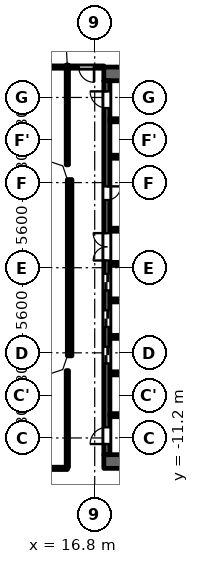
"""IFC4 building model, lengths in metres.
Left out: names, types, materials, properties, quantities, classifications, styles, units other than length and angle.
Written with IfcOpenShell. Run it as: python <this file> out.ifc"""

import sys

from ifc_helpers import new_model, si_unit, direction, frame, frame_2d, origin, place, context, subcontext, project, spatial, polyline, rectangle, outline, extrude, element, fill, save


model = new_model("IFC4")
c1 = context("Model", 3, precision=1e-05, world=origin(), true_north=direction((0.0, 1.0)))
c2 = subcontext(c1, "Body", "Model", "MODEL_VIEW")
j1 = project(units=[si_unit("LENGTHUNIT", "METRE"), si_unit("PLANEANGLEUNIT", "RADIAN")], contexts=[c1])
p1 = place(None, origin())
s1 = spatial("IfcSite", under=j1, at=p1, CompositionType="ELEMENT")
p2 = place(p1, origin())
s2 = spatial("IfcBuilding", under=s1, at=p2, CompositionType="ELEMENT")
p3 = place(p2, frame((0.0, 0.0, 25.7)))
s3 = spatial("IfcBuildingStorey", under=s2, at=p3, CompositionType="ELEMENT", Elevation=25.7)
p4 = place(p3, frame((15.15, 5.8, 0.0), z_axis=(0.0, 0.0, 1.0), x_axis=(0.0, -1.0, 0.0)))
e1 = element("IfcWall", 1, at=p4, inside=s3, PredefinedType="SOLIDWALL", context=c2, shape_type="SweptSolid", body=[
    extrude(rectangle(XDim=11.6, YDim=0.3, at=frame_2d((5.8, 0.0))), origin(), (0.0, 0.0, 1.0), 4.45),
])
for number, where, z_axis, x_axis in (
    (2, (17.4, 12.75, 0.0), (0.0, 0.0, 1.0), (1.0, 0.0, 0.0)),
    (3, (17.4, -12.75, 0.0), (0.0, 0.0, 1.0), (1.0, 0.0, 0.0)),
):
    element("IfcWall", number, at=place(p3, frame(where, z_axis=z_axis, x_axis=x_axis)), inside=s3, PredefinedType="SHEAR", context=c2, shape_type="SweptSolid", body=[
        extrude(rectangle(XDim=10.4, YDim=0.9, at=frame_2d((5.2, 0.0))), origin(), (0.0, 0.0, 1.0), 4.45),
    ])
p5 = place(p3, frame((17.6, -12.3, 0.0), z_axis=(0.0, 0.0, 1.0), x_axis=(0.0, 1.0, 0.0)))
e4 = element("IfcWall", 4, at=p5, inside=s3, PredefinedType="SHEAR", context=c2, shape_type="SweptSolid", body=[
    extrude(rectangle(XDim=24.6, YDim=0.4, at=frame_2d((12.3, 0.0))), origin(), (0.0, 0.0, 1.0), 4.45),
])
p6 = place(p5, frame((6.0, 0.0, 0.0)))
e5 = element("IfcOpeningElement", 5, at=p6, cuts=e4, PredefinedType="OPENING", context=c2, shape_type="SweptSolid", body=[
    extrude(rectangle(XDim=1.1, YDim=2.1, at=frame_2d((0.55, 1.05))), frame((0.0, 0.21, 0.0), z_axis=(0.0, -1.0, 0.0), x_axis=(1.0, 0.0, 0.0)), (0.0, 0.0, 1.0), 0.42),
])
p7 = place(p5, frame((8.4, 0.0, 0.0)))
e6 = element("IfcOpeningElement", 6, at=p7, cuts=e4, PredefinedType="OPENING", context=c2, shape_type="SweptSolid", body=[
    extrude(rectangle(XDim=1.1, YDim=2.1, at=frame_2d((0.55, 1.05))), frame((0.0, 0.21, 0.0), z_axis=(0.0, -1.0, 0.0), x_axis=(1.0, 0.0, 0.0)), (0.0, 0.0, 1.0), 0.42),
])
p8 = place(p5, frame((10.8, 0.0, 0.0)))
e7 = element("IfcOpeningElement", 7, at=p8, cuts=e4, PredefinedType="OPENING", context=c2, shape_type="SweptSolid", body=[
    extrude(rectangle(XDim=1.1, YDim=2.1, at=frame_2d((0.55, 1.05))), frame((0.0, 0.21, 0.0), z_axis=(0.0, -1.0, 0.0), x_axis=(1.0, 0.0, 0.0)), (0.0, 0.0, 1.0), 0.42),
])
p9 = place(p5, frame((16.75, 0.0, 0.0)))
e8 = element("IfcOpeningElement", 8, at=p9, cuts=e4, PredefinedType="OPENING", context=c2, shape_type="SweptSolid", body=[
    extrude(rectangle(XDim=0.9, YDim=2.1, at=frame_2d((0.45, 1.05))), frame((0.0, 0.21, 0.0), z_axis=(0.0, -1.0, 0.0), x_axis=(1.0, 0.0, 0.0)), (0.0, 0.0, 1.0), 0.42),
])
p10 = place(p5, frame((22.8, 0.0, 0.0)))
e9 = element("IfcOpeningElement", 9, at=p10, cuts=e4, PredefinedType="OPENING", context=c2, shape_type="SweptSolid", body=[
    extrude(rectangle(XDim=1.1, YDim=2.1, at=frame_2d((0.55, 1.05))), frame((0.0, 0.21, 0.0), z_axis=(0.0, -1.0, 0.0), x_axis=(1.0, 0.0, 0.0)), (0.0, 0.0, 1.0), 0.42),
])
p11 = place(p5, frame((0.7, 0.0, 0.0)))
e10 = element("IfcOpeningElement", 10, at=p11, cuts=e4, PredefinedType="OPENING", context=c2, shape_type="SweptSolid", body=[
    extrude(rectangle(XDim=1.1, YDim=2.1, at=frame_2d((0.55, 1.05))), frame((0.0, 0.21, 0.0), z_axis=(0.0, -1.0, 0.0), x_axis=(1.0, 0.0, 0.0)), (0.0, 0.0, 1.0), 0.42),
])
p12 = place(p5, frame((12.775, 0.0, 0.0)))
e11 = element("IfcOpeningElement", 11, at=p12, cuts=e4, PredefinedType="OPENING", context=c2, shape_type="SweptSolid", body=[
    extrude(rectangle(XDim=1.8, YDim=2.1, at=frame_2d((0.9, 1.05))), frame((0.0, 0.21, 0.0), z_axis=(0.0, -1.0, 0.0), x_axis=(1.0, 0.0, 0.0)), (0.0, 0.0, 1.0), 0.42),
])
p13 = place(p3, frame((17.8, -9.7, 0.0), z_axis=(0.0, 0.0, 1.0), x_axis=(1.0, 0.0, 0.0)))
e12 = element("IfcWall", 12, at=p13, inside=s3, PredefinedType="SHEAR", context=c2, shape_type="SweptSolid", body=[
    extrude(rectangle(XDim=8.3, YDim=0.2, at=frame_2d((4.15, 0.0))), origin(), (0.0, 0.0, 1.0), 4.45),
])
p14 = place(p13, frame((0.85, 0.0, 0.0)))
e13 = element("IfcOpeningElement", 13, at=p14, cuts=e12, PredefinedType="OPENING", context=c2, shape_type="SweptSolid", body=[
    extrude(rectangle(XDim=1.1, YDim=2.1, at=frame_2d((0.55, 1.05))), frame((0.0, 0.11, 0.0), z_axis=(0.0, -1.0, 0.0), x_axis=(1.0, 0.0, 0.0)), (0.0, 0.0, 1.0), 0.22),
])
p15 = place(p13, frame((3.75, 0.0, 0.0)))
e14 = element("IfcOpeningElement", 14, at=p15, cuts=e12, PredefinedType="OPENING", context=c2, shape_type="SweptSolid", body=[
    extrude(rectangle(XDim=1.1, YDim=2.1, at=frame_2d((0.55, 1.05))), frame((0.0, 0.11, 0.0), z_axis=(0.0, -1.0, 0.0), x_axis=(1.0, 0.0, 0.0)), (0.0, 0.0, 1.0), 0.22),
])
for number, where, z_axis, x_axis in (
    (15, (17.8, -6.95, 0.0), (0.0, 0.0, 1.0), (1.0, 0.0, 0.0)),
    (16, (17.8, -4.55, 0.0), (0.0, 0.0, 1.0), (1.0, 0.0, 0.0)),
    (17, (17.8, -2.15, 0.0), (0.0, 0.0, 1.0), (1.0, 0.0, 0.0)),
):
    element("IfcWall", number, at=place(p3, frame(where, z_axis=z_axis, x_axis=x_axis)), inside=s3, PredefinedType="PARTITIONING", context=c2, shape_type="SweptSolid", body=[
        extrude(rectangle(XDim=2.8, YDim=0.2, at=frame_2d((1.4, 0.0))), origin(), (0.0, 0.0, 1.0), 4.45),
    ])
for number, where, z_axis, x_axis in (
    (18, (17.8, 0.25, 0.0), (0.0, 0.0, 1.0), (1.0, 0.0, 0.0)),
    (19, (17.8, 2.5, 0.0), (0.0, 0.0, 1.0), (1.0, 0.0, 0.0)),
):
    element("IfcWall", number, at=place(p3, frame(where, z_axis=z_axis, x_axis=x_axis)), inside=s3, PredefinedType="PARTITIONING", context=c2, shape_type="SweptSolid", body=[
        extrude(rectangle(XDim=3.0, YDim=0.2, at=frame_2d((1.5, 0.0))), origin(), (0.0, 0.0, 1.0), 4.45),
    ])
p16 = place(p3, frame((17.8, 7.3, 0.0), z_axis=(0.0, 0.0, 1.0), x_axis=(1.0, 0.0, 0.0)))
e20 = element("IfcWall", 20, at=p16, inside=s3, PredefinedType="PARTITIONING", context=c2, shape_type="SweptSolid", body=[
    extrude(rectangle(XDim=2.8, YDim=0.2, at=frame_2d((1.4, 0.0))), origin(), (0.0, 0.0, 1.0), 4.45),
])
p17 = place(p3, frame((17.8, 9.7, 0.0), z_axis=(0.0, 0.0, 1.0), x_axis=(1.0, 0.0, 0.0)))
e21 = element("IfcWall", 21, at=p17, inside=s3, PredefinedType="SHEAR", context=c2, shape_type="SweptSolid", body=[
    extrude(rectangle(XDim=8.3, YDim=0.2, at=frame_2d((4.15, 0.0))), origin(), (0.0, 0.0, 1.0), 4.45),
])
p18 = place(p17, frame((0.85, 0.0, 0.0)))
e22 = element("IfcOpeningElement", 22, at=p18, cuts=e21, PredefinedType="OPENING", context=c2, shape_type="SweptSolid", body=[
    extrude(rectangle(XDim=1.1, YDim=2.1, at=frame_2d((0.55, 1.05))), frame((0.0, 0.11, 0.0), z_axis=(0.0, -1.0, 0.0), x_axis=(1.0, 0.0, 0.0)), (0.0, 0.0, 1.0), 0.22),
])
p19 = place(p17, frame((3.75, 0.0, 0.0)))
e23 = element("IfcOpeningElement", 23, at=p19, cuts=e21, PredefinedType="OPENING", context=c2, shape_type="SweptSolid", body=[
    extrude(rectangle(XDim=1.1, YDim=2.1, at=frame_2d((0.55, 1.05))), frame((0.0, 0.11, 0.0), z_axis=(0.0, -1.0, 0.0), x_axis=(1.0, 0.0, 0.0)), (0.0, 0.0, 1.0), 0.22),
])
p20 = place(p3, frame((-15.005, -13.2, 0.0), z_axis=(0.0, 0.0, 1.0), x_axis=(1.0, 0.0, 0.0)))
e24 = element("IfcWall", 24, at=p20, inside=s3, PredefinedType="PARTITIONING", context=c2, shape_type="SweptSolid", body=[
    extrude(rectangle(XDim=30.01, YDim=0.15, at=frame_2d((15.005, 0.0))), origin(), (0.0, 0.0, 1.0), 4.45),
])
p21 = place(p20, frame((16.855, 0.0, 0.0)))
e25 = element("IfcOpeningElement", 25, at=p21, cuts=e24, PredefinedType="OPENING", context=c2, shape_type="SweptSolid", body=[
    extrude(rectangle(XDim=1.8, YDim=2.1, at=frame_2d((0.9, 1.05))), frame((0.0, 0.085, 0.0), z_axis=(0.0, -1.0, 0.0), x_axis=(1.0, 0.0, 0.0)), (0.0, 0.0, 1.0), 0.17),
])
p22 = place(p3, frame((-17.4, 13.2, 0.0), z_axis=(0.0, 0.0, 1.0), x_axis=(1.0, 0.0, 0.0)))
e26 = element("IfcWall", 26, at=p22, inside=s3, PredefinedType="PARTITIONING", context=c2, shape_type="SweptSolid", body=[
    extrude(rectangle(XDim=34.8, YDim=0.15, at=frame_2d((17.4, 0.0))), origin(), (0.0, 0.0, 1.0), 4.45),
])
p23 = place(p22, frame((3.05, 0.0, 0.0)))
e27 = element("IfcOpeningElement", 27, at=p23, cuts=e26, PredefinedType="OPENING", context=c2, shape_type="SweptSolid", body=[
    extrude(rectangle(XDim=1.8, YDim=2.1, at=frame_2d((0.9, 1.05))), frame((0.0, 0.085, 0.0), z_axis=(0.0, -1.0, 0.0), x_axis=(1.0, 0.0, 0.0)), (0.0, 0.0, 1.0), 0.17),
])
p24 = place(p22, frame((0.75, 0.0, 0.0)))
e28 = element("IfcOpeningElement", 28, at=p24, cuts=e26, PredefinedType="OPENING", context=c2, shape_type="SweptSolid", body=[
    extrude(rectangle(XDim=1.0, YDim=2.1, at=frame_2d((0.5, 1.05))), frame((0.0, 0.085, 0.0), z_axis=(0.0, -1.0, 0.0), x_axis=(1.0, 0.0, 0.0)), (0.0, 0.0, 1.0), 0.17),
])
p25 = place(p22, frame((33.15, 0.0, 0.0)))
e29 = element("IfcOpeningElement", 29, at=p25, cuts=e26, PredefinedType="OPENING", context=c2, shape_type="SweptSolid", body=[
    extrude(rectangle(XDim=1.0, YDim=2.1, at=frame_2d((0.5, 1.05))), frame((0.0, 0.085, 0.0), z_axis=(0.0, -1.0, 0.0), x_axis=(1.0, 0.0, 0.0)), (0.0, 0.0, 1.0), 0.17),
])
for number, where, z_axis, x_axis in (
    (30, (15.0, -13.125, 0.0), (0.0, 0.0, 1.0), (0.0, 1.0, 0.0)),
    (31, (15.0, 6.769, 0.0), (0.0, 0.0, 1.0), (0.0, 1.0, 0.0)),
):
    element("IfcWall", number, at=place(p3, frame(where, z_axis=z_axis, x_axis=x_axis)), inside=s3, PredefinedType="PARTITIONING", context=c2, shape_type="SweptSolid", body=[
        extrude(rectangle(XDim=6.356, YDim=0.15, at=frame_2d((3.178, 0.0))), origin(), (0.0, 0.0, 1.0), 4.45),
    ])
p26 = place(p3, origin())
e32 = element("IfcWall", 32, at=p26, inside=s3, PredefinedType="SOLIDWALL", context=c2, shape_type="SweptSolid", body=[
    extrude(outline(polyline([(14.937, 6.937), (13.849, 7.3), (13.8, 7.3), (13.8, 7.0), (14.7, 6.7), (15.0, 5.8), (15.3, 5.8), (15.3, 5.849), (14.937, 6.937)])), origin(), (0.0, 0.0, 1.0), 4.45),
])
e33 = element("IfcWall", 33, at=p26, inside=s3, PredefinedType="SOLIDWALL", context=c2, shape_type="SweptSolid", body=[
    extrude(outline(polyline([(14.937, -6.937), (15.3, -5.849), (15.3, -5.8), (15.0, -5.8), (14.7, -6.7), (13.8, -7.0), (13.8, -7.3), (13.849, -7.3), (14.937, -6.937)])), origin(), (0.0, 0.0, 1.0), 4.45),
])
p27 = place(p6, origin())
e34 = element("IfcDoor", 34, at=p27, inside=s3, OperationType="DOUBLE_DOOR_SLIDING", PredefinedType="DOOR", context=c2, shape_type="SweptSolid", body=[
    extrude(rectangle(XDim=1.1, YDim=2.1, at=frame_2d((0.55, 1.05))), frame((0.0, 0.025, 0.0), z_axis=(0.0, -1.0, 0.0), x_axis=(1.0, 0.0, 0.0)), (0.0, 0.0, 1.0), 0.05),
])
fill(e5, e34)
p28 = place(p7, origin())
e35 = element("IfcDoor", 35, at=p28, inside=s3, OperationType="DOUBLE_DOOR_SLIDING", PredefinedType="DOOR", context=c2, shape_type="SweptSolid", body=[
    extrude(rectangle(XDim=1.1, YDim=2.1, at=frame_2d((0.55, 1.05))), frame((0.0, 0.025, 0.0), z_axis=(0.0, -1.0, 0.0), x_axis=(1.0, 0.0, 0.0)), (0.0, 0.0, 1.0), 0.05),
])
fill(e6, e35)
p29 = place(p8, origin())
e36 = element("IfcDoor", 36, at=p29, inside=s3, OperationType="DOUBLE_DOOR_SLIDING", PredefinedType="DOOR", context=c2, shape_type="SweptSolid", body=[
    extrude(rectangle(XDim=1.1, YDim=2.1, at=frame_2d((0.55, 1.05))), frame((0.0, 0.025, 0.0), z_axis=(0.0, -1.0, 0.0), x_axis=(1.0, 0.0, 0.0)), (0.0, 0.0, 1.0), 0.05),
])
fill(e7, e36)
p30 = place(p9, origin())
e37 = element("IfcDoor", 37, at=p30, inside=s3, OperationType="SINGLE_SWING_RIGHT", PredefinedType="DOOR", context=c2, shape_type="SweptSolid", body=[
    extrude(rectangle(XDim=0.9, YDim=2.1, at=frame_2d((0.45, 1.05))), frame((0.0, 0.025, 0.0), z_axis=(0.0, -1.0, 0.0), x_axis=(1.0, 0.0, 0.0)), (0.0, 0.0, 1.0), 0.05),
])
fill(e8, e37)
p31 = place(p10, origin())
e38 = element("IfcDoor", 38, at=p31, inside=s3, OperationType="SINGLE_SWING_LEFT", PredefinedType="DOOR", context=c2, shape_type="SweptSolid", body=[
    extrude(rectangle(XDim=1.1, YDim=2.1, at=frame_2d((0.55, 1.05))), frame((0.0, 0.025, 0.0), z_axis=(0.0, -1.0, 0.0), x_axis=(1.0, 0.0, 0.0)), (0.0, 0.0, 1.0), 0.05),
])
fill(e9, e38)
p32 = place(p11, origin())
e39 = element("IfcDoor", 39, at=p32, inside=s3, OperationType="SINGLE_SWING_RIGHT", PredefinedType="DOOR", context=c2, shape_type="SweptSolid", body=[
    extrude(rectangle(XDim=1.1, YDim=2.1, at=frame_2d((0.55, 1.05))), frame((0.0, 0.025, 0.0), z_axis=(0.0, -1.0, 0.0), x_axis=(1.0, 0.0, 0.0)), (0.0, 0.0, 1.0), 0.05),
])
fill(e10, e39)
p33 = place(p12, origin())
e40 = element("IfcDoor", 40, at=p33, inside=s3, OperationType="DOUBLE_DOOR_SINGLE_SWING", PredefinedType="DOOR", context=c2, shape_type="SweptSolid", body=[
    extrude(rectangle(XDim=1.8, YDim=2.1, at=frame_2d((0.9, 1.05))), frame((0.0, 0.025, 0.0), z_axis=(0.0, -1.0, 0.0), x_axis=(1.0, 0.0, 0.0)), (0.0, 0.0, 1.0), 0.05),
])
fill(e11, e40)
p34 = place(p25, origin())
e41 = element("IfcDoor", 41, at=p34, inside=s3, OperationType="SINGLE_SWING_RIGHT", PredefinedType="DOOR", context=c2, shape_type="SweptSolid", body=[
    extrude(rectangle(XDim=1.0, YDim=2.1, at=frame_2d((0.5, 1.05))), frame((0.0, 0.025, 0.0), z_axis=(0.0, -1.0, 0.0), x_axis=(1.0, 0.0, 0.0)), (0.0, 0.0, 1.0), 0.05),
])
fill(e29, e41)
save(model, sys.argv[1])
